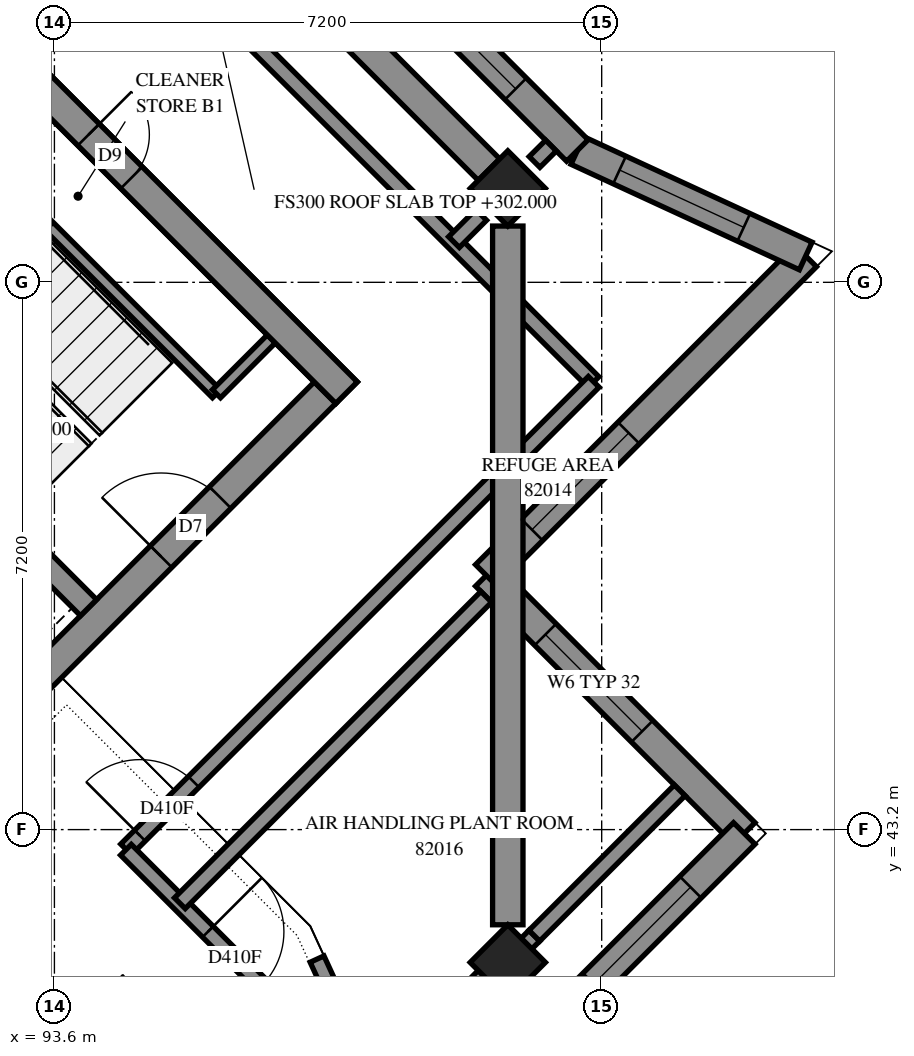
"""IFC4 building model, lengths in metres.
Left out: names, types, materials, properties, quantities, classifications, styles, units other than length and angle.
Written with IfcOpenShell. Run it as: python <this file> out.ifc"""

import sys

from ifc_helpers import new_model, si_unit, direction, frame, frame_2d, origin, origin_2d, place, context, subcontext, project, spatial, polyline, rectangle, outline, extrude, element, fill, save


model = new_model("IFC4")
c1 = context("Model", 3, precision=1e-05, world=origin(), true_north=direction((0.0, 1.0)))
c2 = subcontext(c1, "Body", "Model", "MODEL_VIEW")
j1 = project(units=[si_unit("LENGTHUNIT", "METRE"), si_unit("PLANEANGLEUNIT", "RADIAN")], contexts=[c1])
p1 = place(None, origin())
s1 = spatial("IfcSite", under=j1, at=p1, CompositionType="ELEMENT")
p2 = place(p1, origin())
s2 = spatial("IfcBuilding", under=s1, at=p2, CompositionType="ELEMENT")
p3 = place(p2, frame((0.0, 0.0, 302.0)))
s3 = spatial("IfcBuildingStorey", under=s2, at=p3, CompositionType="ELEMENT", Elevation=302.0)
for number, where, z_axis, x_axis in (
    (1, (99.565, 51.635, 0.0), (0.0, 0.0, 1.0), (0.707, -0.707, 0.0)),
    (2, (99.565, 41.453, 0.0), (0.0, 0.0, 1.0), (0.707, -0.707, 0.0)),
):
    element("IfcColumn", number, at=place(p3, frame(where, z_axis=z_axis, x_axis=x_axis)), inside=s3, PredefinedType="COLUMN", context=c2, shape_type="SweptSolid", body=[
        extrude(rectangle(XDim=0.7, YDim=0.7, at=origin_2d()), origin(), (0.0, 0.0, 1.0), 3.5),
    ])
p4 = place(p3, frame((86.695, 59.696, -0.3), z_axis=(0.0, 0.0, 1.0), x_axis=(0.7071100706, -0.7071034917, 0.0)))
e3 = element("IfcWall", 3, at=p4, inside=s3, PredefinedType="SHEAR", context=c2, shape_type="SweptSolid", body=[
    extrude(outline(polyline([(0.0, 0.0), (15.2, 0.0), (15.2, 3.1), (0.0, 3.1), (0.0, 0.0)])), frame((0.0, 0.2, 0.0), z_axis=(0.0, -1.0, 0.0), x_axis=(1.0, 0.0, 0.0)), (0.0, 0.0, 1.0), 0.4),
])
p5 = place(p4, frame((10.4, 0.0, 0.3)))
e4 = element("IfcOpeningElement", 4, at=p5, cuts=e3, PredefinedType="OPENING", context=c2, shape_type="SweptSolid", body=[
    extrude(rectangle(XDim=0.8, YDim=2.1, at=frame_2d((0.4, 1.05))), frame((0.0, 0.21, 0.0), z_axis=(0.0, -1.0, 0.0), x_axis=(1.0, 0.0, 0.0)), (0.0, 0.0, 1.0), 0.42),
])
p6 = place(p3, frame((89.17, 40.958, -0.3), z_axis=(0.0, 0.0, 1.0), x_axis=(0.7071067812, 0.7071067812, 0.0)))
e5 = element("IfcWall", 5, at=p6, inside=s3, PredefinedType="SHEAR", context=c2, shape_type="SweptSolid", body=[
    extrude(outline(polyline([(0.0, 0.0), (11.3, 0.0), (11.3, 3.1), (0.0, 3.1), (0.0, 0.0)])), frame((0.0, 0.2, 0.0), z_axis=(0.0, -1.0, 0.0), x_axis=(1.0, 0.0, 0.0)), (0.0, 0.0, 1.0), 0.4),
])
p7 = place(p6, frame((1.45, 0.0, 0.3)))
e6 = element("IfcOpeningElement", 6, at=p7, cuts=e5, PredefinedType="OPENING", context=c2, shape_type="SweptSolid", body=[
    extrude(rectangle(XDim=1.1, YDim=2.1, at=frame_2d((0.55, 1.05))), frame((0.0, 0.21, 0.0), z_axis=(0.0, -1.0, 0.0), x_axis=(1.0, 0.0, 0.0)), (0.0, 0.0, 1.0), 0.42),
])
p8 = place(p6, frame((8.25, 0.0, 0.3)))
e7 = element("IfcOpeningElement", 7, at=p8, cuts=e5, PredefinedType="OPENING", context=c2, shape_type="SweptSolid", body=[
    extrude(rectangle(XDim=1.1, YDim=2.1, at=frame_2d((0.55, 1.05))), frame((0.0, 0.21, 0.0), z_axis=(0.0, -1.0, 0.0), x_axis=(1.0, 0.0, 0.0)), (0.0, 0.0, 1.0), 0.42),
])
p9 = place(p3, frame((88.958, 51.211, 0.0), z_axis=(0.0, 0.0, 1.0), x_axis=(0.7070998367, -0.7071137256, 0.0)))
e8 = element("IfcWall", 8, at=p9, inside=s3, PredefinedType="SOLIDWALL", context=c2, shape_type="SweptSolid", body=[
    extrude(outline(polyline([(0.0, 0.0), (7.2, 0.0), (7.2, 3.5), (0.0, 3.5), (0.0, 0.0)])), frame((0.0, 0.15, 0.0), z_axis=(0.0, -1.0, 0.0), x_axis=(1.0, 0.0, 0.0)), (0.0, 0.0, 1.0), 0.3),
])
p10 = place(p3, frame((102.676, 43.15, 0.0), z_axis=(0.0, 0.0, 1.0), x_axis=(-0.7070963646, 0.7071171977, 0.0)))
e9 = element("IfcWall", 9, at=p10, inside=s3, PredefinedType="SOLIDWALL", context=c2, shape_type="SweptSolid", body=[
    extrude(outline(polyline([(-0.2, -0.2), (4.6, -0.2), (5.0, 0.2), (0.2, 0.2), (-0.2, -0.2)])), origin(), (0.0, 0.0, 1.0), 3.5),
])
p11 = place(p10, frame((1.9, 0.0, 0.7)))
e10 = element("IfcOpeningElement", 10, at=p11, cuts=e9, PredefinedType="OPENING", context=c2, shape_type="SweptSolid", body=[
    extrude(rectangle(XDim=1.8, YDim=2.2, at=frame_2d((0.9, 1.1))), frame((0.0, 0.21, 0.0), z_axis=(0.0, -1.0, 0.0), x_axis=(1.0, 0.0, 0.0)), (0.0, 0.0, 1.0), 0.42),
])
p12 = place(p3, frame((99.282, 46.544, 0.0), z_axis=(0.0, 0.0, 1.0), x_axis=(0.7071067812, 0.7071067812, 0.0)))
e11 = element("IfcWall", 11, at=p12, inside=s3, PredefinedType="SOLIDWALL", context=c2, shape_type="SweptSolid", body=[
    extrude(outline(polyline([(0.2, -0.2), (6.23, -0.2), (5.657, 0.2), (-0.2, 0.2), (0.2, -0.2)])), origin(), (0.0, 0.0, 1.0), 3.5),
])
p13 = place(p12, frame((0.85, 0.0, 0.7)))
e12 = element("IfcOpeningElement", 12, at=p13, cuts=e11, PredefinedType="OPENING", context=c2, shape_type="SweptSolid", body=[
    extrude(rectangle(XDim=1.8, YDim=2.2, at=frame_2d((0.9, 1.1))), frame((0.0, 0.21, 0.0), z_axis=(0.0, -1.0, 0.0), x_axis=(1.0, 0.0, 0.0)), (0.0, 0.0, 1.0), 0.42),
])
p14 = place(p3, frame((103.484, 50.747, 0.0), z_axis=(0.0, 0.0, 1.0), x_axis=(-0.9078558767, 0.4192823716, 0.0)))
e13 = element("IfcWall", 13, at=p14, inside=s3, PredefinedType="SOLIDWALL", context=c2, shape_type="SweptSolid", body=[
    extrude(outline(polyline([(-0.287, -0.2), (3.273, -0.2), (3.345, 0.2), (0.287, 0.2), (-0.287, -0.2)])), origin(), (0.0, 0.0, 1.0), 3.5),
])
p15 = place(p14, frame((0.898, 0.0, 0.7)))
e14 = element("IfcOpeningElement", 14, at=p15, cuts=e13, PredefinedType="OPENING", context=c2, shape_type="SweptSolid", body=[
    extrude(rectangle(XDim=1.8, YDim=2.2, at=frame_2d((0.9, 1.1))), frame((0.0, 0.21, 0.0), z_axis=(0.0, -1.0, 0.0), x_axis=(1.0, 0.0, 0.0)), (0.0, 0.0, 1.0), 0.42),
])
p16 = place(p3, frame((100.48, 52.134, 0.0), z_axis=(0.0, 0.0, 1.0), x_axis=(-0.7071067812, 0.7071067812, 0.0)))
e15 = element("IfcWall", 15, at=p16, inside=s3, PredefinedType="SOLIDWALL", context=c2, shape_type="SweptSolid", body=[
    extrude(outline(polyline([(0.036, -0.2), (6.718, -0.2), (6.718, 0.2), (-0.036, 0.2), (0.036, -0.2)])), origin(), (0.0, 0.0, 1.0), 3.5),
])
p17 = place(p16, frame((1.147, 0.0, 0.7)))
e16 = element("IfcOpeningElement", 16, at=p17, cuts=e15, PredefinedType="OPENING", context=c2, shape_type="SweptSolid", body=[
    extrude(rectangle(XDim=1.8, YDim=2.2, at=frame_2d((0.9, 1.1))), frame((0.0, 0.21, 0.0), z_axis=(0.0, -1.0, 0.0), x_axis=(1.0, 0.0, 0.0)), (0.0, 0.0, 1.0), 0.42),
])
p18 = place(p16, frame((4.306, 0.0, 0.7)))
e17 = element("IfcOpeningElement", 17, at=p18, cuts=e15, PredefinedType="OPENING", context=c2, shape_type="SweptSolid", body=[
    extrude(rectangle(XDim=1.8, YDim=2.2, at=frame_2d((0.9, 1.1))), frame((0.0, 0.21, 0.0), z_axis=(0.0, -1.0, 0.0), x_axis=(1.0, 0.0, 0.0)), (0.0, 0.0, 1.0), 0.42),
])
p19 = place(p3, frame((72.821, 56.6, 0.0), z_axis=(0.0, 0.0, 1.0), x_axis=(0.7071067812, -0.7071067812, 0.0)))
e18 = element("IfcWall", 18, at=p19, inside=s3, PredefinedType="SOLIDWALL", context=c2, shape_type="SweptSolid", body=[
    extrude(outline(polyline([(0.083, -0.2), (30.821, -0.2), (30.421, 0.2), (-0.083, 0.2), (0.083, -0.2)])), origin(), (0.0, 0.0, 1.0), 3.5),
])
p20 = place(p19, frame((2.421, 0.0, 0.7)))
e19 = element("IfcOpeningElement", 19, at=p20, cuts=e18, PredefinedType="OPENING", context=c2, shape_type="SweptSolid", body=[
    extrude(rectangle(XDim=1.8, YDim=2.2, at=frame_2d((0.9, 1.1))), frame((0.0, 0.21, 0.0), z_axis=(0.0, -1.0, 0.0), x_axis=(1.0, 0.0, 0.0)), (0.0, 0.0, 1.0), 0.42),
])
p21 = place(p19, frame((5.521, 0.0, 0.7)))
e20 = element("IfcOpeningElement", 20, at=p21, cuts=e18, PredefinedType="OPENING", context=c2, shape_type="SweptSolid", body=[
    extrude(rectangle(XDim=1.8, YDim=2.2, at=frame_2d((0.9, 1.1))), frame((0.0, 0.21, 0.0), z_axis=(0.0, -1.0, 0.0), x_axis=(1.0, 0.0, 0.0)), (0.0, 0.0, 1.0), 0.42),
])
p22 = place(p19, frame((8.921, 0.0, 0.7)))
e21 = element("IfcOpeningElement", 21, at=p22, cuts=e18, PredefinedType="OPENING", context=c2, shape_type="SweptSolid", body=[
    extrude(rectangle(XDim=1.8, YDim=2.2, at=frame_2d((0.9, 1.1))), frame((0.0, 0.21, 0.0), z_axis=(0.0, -1.0, 0.0), x_axis=(1.0, 0.0, 0.0)), (0.0, 0.0, 1.0), 0.42),
])
p23 = place(p19, frame((12.521, 0.0, 0.7)))
e22 = element("IfcOpeningElement", 22, at=p23, cuts=e18, PredefinedType="OPENING", context=c2, shape_type="SweptSolid", body=[
    extrude(rectangle(XDim=1.8, YDim=2.2, at=frame_2d((0.9, 1.1))), frame((0.0, 0.21, 0.0), z_axis=(0.0, -1.0, 0.0), x_axis=(1.0, 0.0, 0.0)), (0.0, 0.0, 1.0), 0.42),
])
p24 = place(p19, frame((16.121, 0.0, 0.7)))
e23 = element("IfcOpeningElement", 23, at=p24, cuts=e18, PredefinedType="OPENING", context=c2, shape_type="SweptSolid", body=[
    extrude(rectangle(XDim=1.8, YDim=2.2, at=frame_2d((0.9, 1.1))), frame((0.0, 0.21, 0.0), z_axis=(0.0, -1.0, 0.0), x_axis=(1.0, 0.0, 0.0)), (0.0, 0.0, 1.0), 0.42),
])
p25 = place(p19, frame((19.721, 0.0, 0.7)))
e24 = element("IfcOpeningElement", 24, at=p25, cuts=e18, PredefinedType="OPENING", context=c2, shape_type="SweptSolid", body=[
    extrude(rectangle(XDim=1.8, YDim=2.2, at=frame_2d((0.9, 1.1))), frame((0.0, 0.21, 0.0), z_axis=(0.0, -1.0, 0.0), x_axis=(1.0, 0.0, 0.0)), (0.0, 0.0, 1.0), 0.42),
])
p26 = place(p19, frame((23.071, 0.0, 0.7)))
e25 = element("IfcOpeningElement", 25, at=p26, cuts=e18, PredefinedType="OPENING", context=c2, shape_type="SweptSolid", body=[
    extrude(rectangle(XDim=1.8, YDim=2.2, at=frame_2d((0.9, 1.1))), frame((0.0, 0.21, 0.0), z_axis=(0.0, -1.0, 0.0), x_axis=(1.0, 0.0, 0.0)), (0.0, 0.0, 1.0), 0.42),
])
p27 = place(p19, frame((26.921, 0.0, 0.7)))
e26 = element("IfcOpeningElement", 26, at=p27, cuts=e18, PredefinedType="OPENING", context=c2, shape_type="SweptSolid", body=[
    extrude(rectangle(XDim=1.8, YDim=2.2, at=frame_2d((0.9, 1.1))), frame((0.0, 0.21, 0.0), z_axis=(0.0, -1.0, 0.0), x_axis=(1.0, 0.0, 0.0)), (0.0, 0.0, 1.0), 0.42),
])
p28 = place(p3, frame((94.474, 34.948, 0.0), z_axis=(0.0, 0.0, 1.0), x_axis=(0.7071110915, 0.7071024708, 0.0)))
e27 = element("IfcWall", 27, at=p28, inside=s3, PredefinedType="SOLIDWALL", context=c2, shape_type="SweptSolid", body=[
    extrude(outline(polyline([(-0.2, -0.2), (11.8, -0.2), (11.4, 0.2), (0.2, 0.2), (-0.2, -0.2)])), origin(), (0.0, 0.0, 1.0), 3.5),
])
p29 = place(p28, frame((1.6, 0.0, 0.7)))
e28 = element("IfcOpeningElement", 28, at=p29, cuts=e27, PredefinedType="OPENING", context=c2, shape_type="SweptSolid", body=[
    extrude(rectangle(XDim=1.8, YDim=2.2, at=frame_2d((0.9, 1.1))), frame((0.0, 0.21, 0.0), z_axis=(0.0, -1.0, 0.0), x_axis=(1.0, 0.0, 0.0)), (0.0, 0.0, 1.0), 0.42),
])
p30 = place(p28, frame((5.8, 0.0, 0.7)))
e29 = element("IfcOpeningElement", 29, at=p30, cuts=e27, PredefinedType="OPENING", context=c2, shape_type="SweptSolid", body=[
    extrude(rectangle(XDim=1.8, YDim=2.2, at=frame_2d((0.9, 1.1))), frame((0.0, 0.21, 0.0), z_axis=(0.0, -1.0, 0.0), x_axis=(1.0, 0.0, 0.0)), (0.0, 0.0, 1.0), 0.42),
])
p31 = place(p28, frame((8.8, 0.0, 0.7)))
e30 = element("IfcOpeningElement", 30, at=p31, cuts=e27, PredefinedType="OPENING", context=c2, shape_type="SweptSolid", body=[
    extrude(rectangle(XDim=1.8, YDim=2.2, at=frame_2d((0.9, 1.1))), frame((0.0, 0.21, 0.0), z_axis=(0.0, -1.0, 0.0), x_axis=(1.0, 0.0, 0.0)), (0.0, 0.0, 1.0), 0.42),
])
p32 = place(p3, frame((91.313, 53.354, 0.0), z_axis=(0.0, 0.0, 1.0), x_axis=(0.7071147811, -0.7070987812, 0.0)))
e31 = element("IfcWall", 31, at=p32, inside=s3, PredefinedType="PARTITIONING", context=c2, shape_type="SweptSolid", body=[
    extrude(outline(polyline([(0.0, 0.0), (6.25, 0.0), (6.25, 3.5), (0.0, 3.5), (0.0, 0.0)])), frame((0.0, 0.075, 0.0), z_axis=(0.0, -1.0, 0.0), x_axis=(1.0, 0.0, 0.0)), (0.0, 0.0, 1.0), 0.15),
])
p33 = place(p3, frame((95.732, 48.934, 0.0), z_axis=(0.0, 0.0, 1.0), x_axis=(0.7071067812, 0.7071067812, 0.0)))
e32 = element("IfcWall", 32, at=p33, inside=s3, PredefinedType="PARTITIONING", context=c2, shape_type="SweptSolid", body=[
    extrude(outline(polyline([(0.0, 0.0), (1.02, 0.0), (1.02, 3.5), (0.0, 3.5), (0.0, 0.0)])), frame((0.0, 0.075, 0.0), z_axis=(0.0, -1.0, 0.0), x_axis=(1.0, 0.0, 0.0)), (0.0, 0.0, 1.0), 0.15),
])
p34 = place(p3, frame((86.833, 62.947, 0.0), z_axis=(0.0, 0.0, 1.0), x_axis=(0.7071067812, -0.7071067812, 0.0)))
e33 = element("IfcWall", 33, at=p34, inside=s3, PredefinedType="PARTITIONING", context=c2, shape_type="SweptSolid", body=[
    extrude(rectangle(XDim=19.601, YDim=0.2, at=frame_2d((9.8, 0.0))), origin(), (0.0, 0.0, 1.0), 3.5),
])
p35 = place(p34, frame((10.386, 0.0, 0.0)))
e34 = element("IfcOpeningElement", 34, at=p35, cuts=e33, PredefinedType="OPENING", context=c2, shape_type="SweptSolid", body=[
    extrude(rectangle(XDim=1.0, YDim=2.1, at=frame_2d((0.5, 1.05))), frame((0.0, 0.11, 0.0), z_axis=(0.0, -1.0, 0.0), x_axis=(1.0, 0.0, 0.0)), (0.0, 0.0, 1.0), 0.22),
])
p36 = place(p3, frame((94.543, 42.939, 0.0), z_axis=(0.0, 0.0, 1.0), x_axis=(0.7071067812, 0.7071067812, 0.0)))
e35 = element("IfcWall", 35, at=p36, inside=s3, PredefinedType="PARTITIONING", context=c2, shape_type="SweptSolid", body=[
    extrude(rectangle(XDim=8.7, YDim=0.2, at=frame_2d((4.35, 0.0))), origin(), (0.0, 0.0, 1.0), 3.5),
])
p37 = place(p36, frame((0.258, 0.0, 0.0)))
e36 = element("IfcOpeningElement", 36, at=p37, cuts=e35, PredefinedType="OPENING", context=c2, shape_type="SweptSolid", body=[
    extrude(rectangle(XDim=1.0, YDim=2.1, at=frame_2d((0.5, 1.05))), frame((0.0, 0.11, 0.0), z_axis=(0.0, -1.0, 0.0), x_axis=(1.0, 0.0, 0.0)), (0.0, 0.0, 1.0), 0.22),
])
p38 = place(p3, frame((94.541, 42.935, 0.0), z_axis=(0.0, 0.0, 1.0), x_axis=(0.7071067812, -0.7071067812, 0.0)))
e37 = element("IfcWall", 37, at=p38, inside=s3, PredefinedType="PARTITIONING", context=c2, shape_type="SweptSolid", body=[
    extrude(rectangle(XDim=4.599, YDim=0.2, at=frame_2d((2.3, 0.0))), origin(), (0.0, 0.0, 1.0), 3.5),
])
p39 = place(p38, frame((1.525, 0.0, 0.0)))
e38 = element("IfcOpeningElement", 38, at=p39, cuts=e37, PredefinedType="OPENING", context=c2, shape_type="SweptSolid", body=[
    extrude(rectangle(XDim=1.0, YDim=2.1, at=frame_2d((0.5, 1.05))), frame((0.0, 0.11, 0.0), z_axis=(0.0, -1.0, 0.0), x_axis=(1.0, 0.0, 0.0)), (0.0, 0.0, 1.0), 0.22),
])
p40 = place(p3, frame((97.796, 39.686, 0.0), z_axis=(0.0, 0.0, 1.0), x_axis=(0.7071067812, 0.7071067812, 0.0)))
e39 = element("IfcWall", 39, at=p40, inside=s3, PredefinedType="PARTITIONING", context=c2, shape_type="SweptSolid", body=[
    extrude(rectangle(XDim=2.995, YDim=0.2, at=frame_2d((1.498, 0.0))), origin(), (0.0, 0.0, 1.0), 3.5),
])
p41 = place(p3, frame((93.131, 41.241, 0.0), z_axis=(0.0, 0.0, 1.0), x_axis=(0.7083571881, -0.7058541592, 0.0)))
e40 = element("IfcWall", 40, at=p41, inside=s3, PredefinedType="PARTITIONING", context=c2, shape_type="SweptSolid", body=[
    extrude(rectangle(XDim=0.799, YDim=0.2, at=frame_2d((0.4, 0.0))), origin(), (0.0, 0.0, 1.0), 3.5),
])
p42 = place(p3, frame((98.857, 50.929, 0.0), z_axis=(0.0, 0.0, 1.0), x_axis=(0.7071067812, 0.7071067812, 0.0)))
e41 = element("IfcWall", 41, at=p42, inside=s3, PredefinedType="PARTITIONING", context=c2, shape_type="SweptSolid", body=[
    extrude(rectangle(XDim=0.506, YDim=0.2, at=frame_2d((0.253, 0.0))), origin(), (0.0, 0.0, 1.0), 3.5),
])
p43 = place(p3, frame((98.215, 38.972, 0.0), z_axis=(0.0, 0.0, 1.0), x_axis=(-0.4174664315, 0.9086923454, 0.0)))
e42 = element("IfcWall", 42, at=p43, inside=s3, PredefinedType="PARAPET", context=c2, shape_type="SweptSolid", body=[
    extrude(outline(polyline([(0.0, -0.1), (2.778, -0.1), (2.778, 0.1), (0.0, 0.1), (0.0, -0.1)])), origin(), (0.0, 0.0, 1.0), 0.25),
])
p44 = place(p3, frame((95.25, 42.232, 0.0), z_axis=(0.0, 0.0, 1.0), x_axis=(0.7071067812, 0.7071067812, 0.0)))
e43 = element("IfcWall", 43, at=p44, inside=s3, PredefinedType="PARTITIONING", context=c2, shape_type="SweptSolid", body=[
    extrude(outline(polyline([(0.0, -0.1), (5.7, -0.1), (5.7, 0.1), (0.0, 0.1), (0.0, -0.1)])), origin(), (0.0, 0.0, 1.0), 3.5),
])
p45 = place(p3, frame((99.914, 41.804, 0.0), z_axis=(0.0, 0.0, 1.0), x_axis=(0.7071067812, 0.7071067812, 0.0)))
e44 = element("IfcWall", 44, at=p45, inside=s3, PredefinedType="PARTITIONING", context=c2, shape_type="SweptSolid", body=[
    extrude(outline(polyline([(0.0, -0.1), (2.705, -0.1), (2.705, 0.1), (0.0, 0.1), (0.0, -0.1)])), origin(), (0.0, 0.0, 1.0), 3.5),
])
p46 = place(p3, frame((99.917, 51.983, 0.0), z_axis=(0.0, 0.0, 1.0), x_axis=(0.7087439748, 0.7054657881, 0.0)))
e45 = element("IfcWall", 45, at=p46, inside=s3, PredefinedType="PARTITIONING", context=c2, shape_type="SweptSolid", body=[
    extrude(outline(polyline([(0.0, -0.1), (0.305, -0.1), (0.305, 0.1), (0.0, 0.1), (0.0, -0.1)])), origin(), (0.0, 0.0, 1.0), 3.5),
])
p47 = place(p11, origin())
e46 = element("IfcWindow", 46, at=p47, inside=s3, PartitioningType="SINGLE_PANEL", PredefinedType="WINDOW", context=c2, shape_type="SweptSolid", body=[
    extrude(rectangle(XDim=1.8, YDim=2.2, at=frame_2d((0.9, 1.1))), frame((0.0, 0.08, 0.0), z_axis=(0.0, -1.0, 0.0), x_axis=(1.0, 0.0, 0.0)), (0.0, 0.0, 1.0), 0.06),
])
fill(e10, e46)
p48 = place(p13, origin())
e47 = element("IfcWindow", 47, at=p48, inside=s3, PartitioningType="SINGLE_PANEL", PredefinedType="WINDOW", context=c2, shape_type="SweptSolid", body=[
    extrude(rectangle(XDim=1.8, YDim=2.2, at=frame_2d((0.9, 1.1))), frame((0.0, 0.08, 0.0), z_axis=(0.0, -1.0, 0.0), x_axis=(1.0, 0.0, 0.0)), (0.0, 0.0, 1.0), 0.06),
])
fill(e12, e47)
p49 = place(p15, origin())
e48 = element("IfcWindow", 48, at=p49, inside=s3, PartitioningType="SINGLE_PANEL", PredefinedType="WINDOW", context=c2, shape_type="SweptSolid", body=[
    extrude(rectangle(XDim=1.8, YDim=2.2, at=frame_2d((0.9, 1.1))), frame((0.0, 0.08, 0.0), z_axis=(0.0, -1.0, 0.0), x_axis=(1.0, 0.0, 0.0)), (0.0, 0.0, 1.0), 0.06),
])
fill(e14, e48)
p50 = place(p17, origin())
e49 = element("IfcWindow", 49, at=p50, inside=s3, PartitioningType="SINGLE_PANEL", PredefinedType="WINDOW", context=c2, shape_type="SweptSolid", body=[
    extrude(rectangle(XDim=1.8, YDim=2.2, at=frame_2d((0.9, 1.1))), frame((0.0, 0.08, 0.0), z_axis=(0.0, -1.0, 0.0), x_axis=(1.0, 0.0, 0.0)), (0.0, 0.0, 1.0), 0.06),
])
fill(e16, e49)
p51 = place(p31, origin())
e50 = element("IfcWindow", 50, at=p51, inside=s3, PartitioningType="SINGLE_PANEL", PredefinedType="WINDOW", context=c2, shape_type="SweptSolid", body=[
    extrude(rectangle(XDim=1.8, YDim=2.2, at=frame_2d((0.9, 1.1))), frame((0.0, 0.08, 0.0), z_axis=(0.0, -1.0, 0.0), x_axis=(1.0, 0.0, 0.0)), (0.0, 0.0, 1.0), 0.06),
])
fill(e30, e50)
p52 = place(p5, origin())
e51 = element("IfcDoor", 51, at=p52, inside=s3, OperationType="SINGLE_SWING_RIGHT", PredefinedType="DOOR", context=c2, shape_type="SweptSolid", body=[
    extrude(rectangle(XDim=0.8, YDim=2.1, at=frame_2d((0.4, 1.05))), frame((0.0, 0.025, 0.0), z_axis=(0.0, -1.0, 0.0), x_axis=(1.0, 0.0, 0.0)), (0.0, 0.0, 1.0), 0.05),
])
fill(e4, e51)
p53 = place(p8, origin())
e52 = element("IfcDoor", 52, at=p53, inside=s3, OperationType="SINGLE_SWING_RIGHT", PredefinedType="DOOR", context=c2, shape_type="SweptSolid", body=[
    extrude(rectangle(XDim=1.1, YDim=2.1, at=frame_2d((0.55, 1.05))), frame((0.0, 0.025, 0.0), z_axis=(0.0, -1.0, 0.0), x_axis=(1.0, 0.0, 0.0)), (0.0, 0.0, 1.0), 0.05),
])
fill(e7, e52)
p54 = place(p37, origin())
e53 = element("IfcDoor", 53, at=p54, inside=s3, OperationType="SINGLE_SWING_LEFT", PredefinedType="DOOR", context=c2, shape_type="SweptSolid", body=[
    extrude(rectangle(XDim=1.0, YDim=2.1, at=frame_2d((0.5, 1.05))), frame((0.0, 0.025, 0.0), z_axis=(0.0, -1.0, 0.0), x_axis=(1.0, 0.0, 0.0)), (0.0, 0.0, 1.0), 0.05),
])
fill(e36, e53)
p55 = place(p39, origin())
e54 = element("IfcDoor", 54, at=p55, inside=s3, OperationType="SINGLE_SWING_RIGHT", PredefinedType="DOOR", context=c2, shape_type="SweptSolid", body=[
    extrude(rectangle(XDim=1.0, YDim=2.1, at=frame_2d((0.5, 1.05))), frame((0.0, 0.025, 0.0), z_axis=(0.0, -1.0, 0.0), x_axis=(1.0, 0.0, 0.0)), (0.0, 0.0, 1.0), 0.05),
])
fill(e38, e54)
save(model, sys.argv[1])
